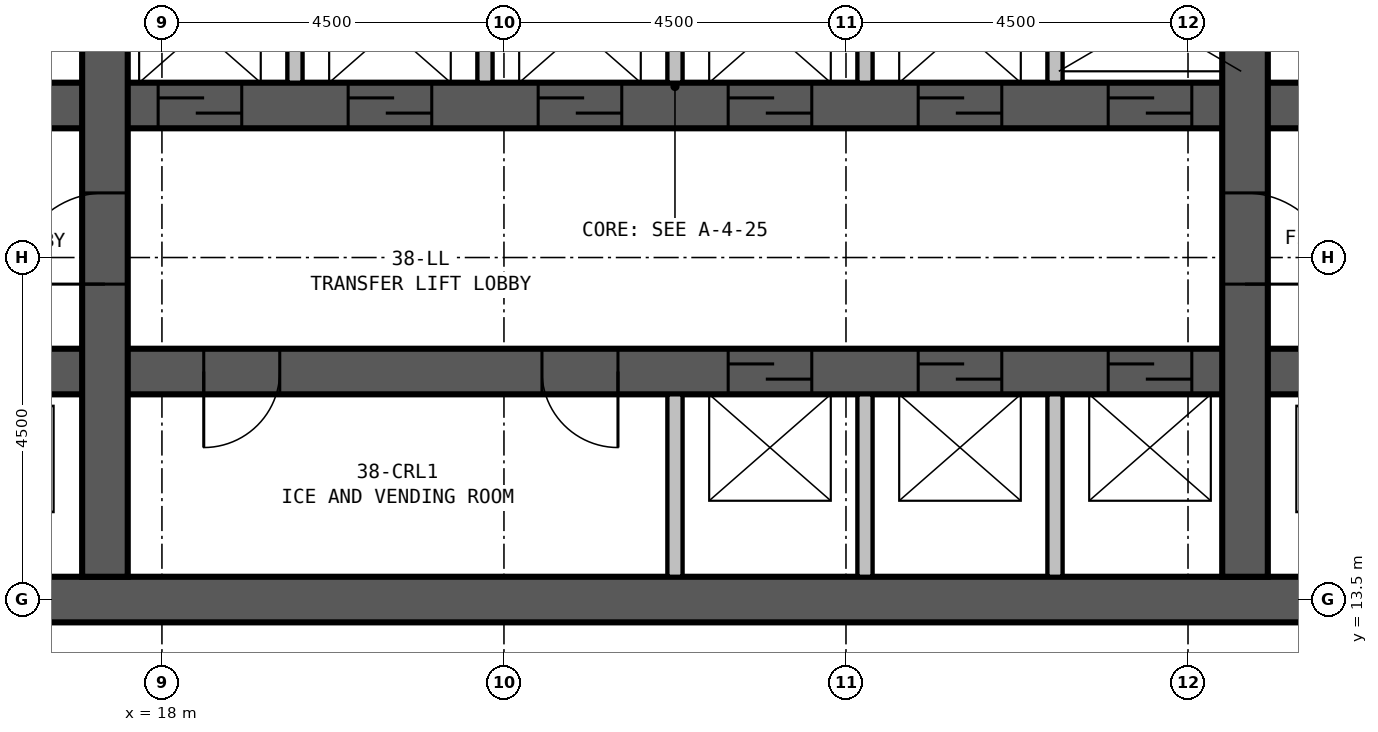
"""IFC4 building model, lengths in metres.
Left out: names, types, materials, properties, quantities, classifications, styles, units other than length and angle.
Written with IfcOpenShell. Run it as: python <this file> out.ifc"""

import sys

from ifc_helpers import new_model, si_unit, direction, frame, frame_2d, origin, place, context, subcontext, project, spatial, rectangle, extrude, element, fill, save


model = new_model("IFC4")
c1 = context("Model", 3, precision=1e-05, world=origin(), true_north=direction((0.0, 1.0)))
c2 = subcontext(c1, "Body", "Model", "MODEL_VIEW")
j1 = project(units=[si_unit("LENGTHUNIT", "METRE"), si_unit("PLANEANGLEUNIT", "RADIAN")], contexts=[c1])
p1 = place(None, origin())
s1 = spatial("IfcSite", under=j1, at=p1, CompositionType="ELEMENT")
p2 = place(p1, origin())
s2 = spatial("IfcBuilding", under=s1, at=p2, CompositionType="ELEMENT")
p3 = place(p2, frame((0.0, 0.0, 145.9)))
s3 = spatial("IfcBuildingStorey", under=s2, at=p3, CompositionType="ELEMENT", Elevation=145.9)
p4 = place(p3, frame((13.2, 13.5, 0.0), z_axis=(0.0, 0.0, 1.0), x_axis=(1.0, 0.0, 0.0)))
e1 = element("IfcWall", 1, at=p4, inside=s3, PredefinedType="SHEAR", context=c2, shape_type="SweptSolid", body=[
    extrude(rectangle(XDim=23.1, YDim=0.6, at=frame_2d((11.55, 0.0))), origin(), (0.0, 0.0, 1.0), 6.0),
])
p5 = place(p3, frame((17.25, 13.8, 0.0), z_axis=(0.0, 0.0, 1.0), x_axis=(0.0, 1.0, 0.0)))
e2 = element("IfcWall", 2, at=p5, inside=s3, PredefinedType="SHEAR", context=c2, shape_type="SweptSolid", body=[
    extrude(rectangle(XDim=12.9, YDim=0.6, at=frame_2d((6.45, 0.0))), origin(), (0.0, 0.0, 1.0), 6.0),
])
p6 = place(p5, frame((3.85, 0.0, 0.0)))
e3 = element("IfcOpeningElement", 3, at=p6, cuts=e2, PredefinedType="OPENING", context=c2, shape_type="SweptSolid", body=[
    extrude(rectangle(XDim=1.2, YDim=2.1, at=frame_2d((0.6, 1.05))), frame((0.0, 0.31, 0.0), z_axis=(0.0, -1.0, 0.0), x_axis=(1.0, 0.0, 0.0)), (0.0, 0.0, 1.0), 0.62),
])
p7 = place(p3, frame((32.25, 13.8, 0.0), z_axis=(0.0, 0.0, 1.0), x_axis=(0.0, 1.0, 0.0)))
e4 = element("IfcWall", 4, at=p7, inside=s3, PredefinedType="SHEAR", context=c2, shape_type="SweptSolid", body=[
    extrude(rectangle(XDim=12.9, YDim=0.6, at=frame_2d((6.45, 0.0))), origin(), (0.0, 0.0, 1.0), 6.0),
])
p8 = place(p7, frame((5.05, 0.0, 0.0), z_axis=(0.0, 0.0, 1.0), x_axis=(-1.0, 0.0, 0.0)))
e5 = element("IfcOpeningElement", 5, at=p8, cuts=e4, PredefinedType="OPENING", context=c2, shape_type="SweptSolid", body=[
    extrude(rectangle(XDim=1.2, YDim=2.1, at=frame_2d((0.6, 1.05))), frame((0.0, 0.31, 0.0), z_axis=(0.0, -1.0, 0.0), x_axis=(1.0, 0.0, 0.0)), (0.0, 0.0, 1.0), 0.62),
])
p9 = place(p3, frame((13.8, 16.5, 0.0), z_axis=(0.0, 0.0, 1.0), x_axis=(1.0, 0.0, 0.0)))
e6 = element("IfcWall", 6, at=p9, inside=s3, PredefinedType="SHEAR", context=c2, shape_type="SweptSolid", body=[
    extrude(rectangle(XDim=21.9, YDim=0.6, at=frame_2d((10.95, 0.0))), origin(), (0.0, 0.0, 1.0), 6.0),
])
p10 = place(p9, frame((11.65, 0.0, 0.0)))
e7 = element("IfcOpeningElement", 7, at=p10, cuts=e6, PredefinedType="OPENING", context=c2, shape_type="SweptSolid", body=[
    extrude(rectangle(XDim=1.1, YDim=2.1, at=frame_2d((0.55, 1.05))), frame((0.0, 0.31, 0.0), z_axis=(0.0, -1.0, 0.0), x_axis=(1.0, 0.0, 0.0)), (0.0, 0.0, 1.0), 0.62),
])
p11 = place(p9, frame((14.15, 0.0, 0.0)))
e8 = element("IfcOpeningElement", 8, at=p11, cuts=e6, PredefinedType="OPENING", context=c2, shape_type="SweptSolid", body=[
    extrude(rectangle(XDim=1.1, YDim=2.1, at=frame_2d((0.55, 1.05))), frame((0.0, 0.31, 0.0), z_axis=(0.0, -1.0, 0.0), x_axis=(1.0, 0.0, 0.0)), (0.0, 0.0, 1.0), 0.62),
])
p12 = place(p9, frame((16.65, 0.0, 0.0)))
e9 = element("IfcOpeningElement", 9, at=p12, cuts=e6, PredefinedType="OPENING", context=c2, shape_type="SweptSolid", body=[
    extrude(rectangle(XDim=1.1, YDim=2.1, at=frame_2d((0.55, 1.05))), frame((0.0, 0.31, 0.0), z_axis=(0.0, -1.0, 0.0), x_axis=(1.0, 0.0, 0.0)), (0.0, 0.0, 1.0), 0.62),
])
p13 = place(p9, frame((5.75, 0.0, 0.0), z_axis=(0.0, 0.0, 1.0), x_axis=(-1.0, 0.0, 0.0)))
e10 = element("IfcOpeningElement", 10, at=p13, cuts=e6, PredefinedType="OPENING", context=c2, shape_type="SweptSolid", body=[
    extrude(rectangle(XDim=1.0, YDim=2.1, at=frame_2d((0.5, 1.05))), frame((0.0, 0.31, 0.0), z_axis=(0.0, -1.0, 0.0), x_axis=(1.0, 0.0, 0.0)), (0.0, 0.0, 1.0), 0.62),
])
p14 = place(p9, frame((10.2, 0.0, 0.0), z_axis=(0.0, 0.0, 1.0), x_axis=(-1.0, 0.0, 0.0)))
e11 = element("IfcOpeningElement", 11, at=p14, cuts=e6, PredefinedType="OPENING", context=c2, shape_type="SweptSolid", body=[
    extrude(rectangle(XDim=1.0, YDim=2.1, at=frame_2d((0.5, 1.05))), frame((0.0, 0.31, 0.0), z_axis=(0.0, -1.0, 0.0), x_axis=(1.0, 0.0, 0.0)), (0.0, 0.0, 1.0), 0.62),
])
p15 = place(p9, frame((0.6, 0.0, 0.0)))
e12 = element("IfcOpeningElement", 12, at=p15, cuts=e6, PredefinedType="OPENING", context=c2, shape_type="SweptSolid", body=[
    extrude(rectangle(XDim=1.2, YDim=2.1, at=frame_2d((0.6, 1.05))), frame((0.0, 0.31, 0.0), z_axis=(0.0, -1.0, 0.0), x_axis=(1.0, 0.0, 0.0)), (0.0, 0.0, 1.0), 0.62),
])
p16 = place(p9, frame((19.6, 0.0, 0.0)))
e13 = element("IfcOpeningElement", 13, at=p16, cuts=e6, PredefinedType="OPENING", context=c2, shape_type="SweptSolid", body=[
    extrude(rectangle(XDim=1.2, YDim=2.1, at=frame_2d((0.6, 1.05))), frame((0.0, 0.31, 0.0), z_axis=(0.0, -1.0, 0.0), x_axis=(1.0, 0.0, 0.0)), (0.0, 0.0, 1.0), 0.62),
])
p17 = place(p3, frame((13.8, 20.0, 0.0), z_axis=(0.0, 0.0, 1.0), x_axis=(1.0, 0.0, 0.0)))
e14 = element("IfcWall", 14, at=p17, inside=s3, PredefinedType="SHEAR", context=c2, shape_type="SweptSolid", body=[
    extrude(rectangle(XDim=21.9, YDim=0.6, at=frame_2d((10.95, 0.0))), origin(), (0.0, 0.0, 1.0), 6.0),
])
p18 = place(p17, frame((0.5, 0.0, 0.0)))
e15 = element("IfcOpeningElement", 15, at=p18, cuts=e14, PredefinedType="OPENING", context=c2, shape_type="SweptSolid", body=[
    extrude(rectangle(XDim=1.0, YDim=2.1, at=frame_2d((0.5, 1.05))), frame((0.0, 0.31, 0.0), z_axis=(0.0, -1.0, 0.0), x_axis=(1.0, 0.0, 0.0)), (0.0, 0.0, 1.0), 0.62),
])
p19 = place(p17, frame((20.5, 0.0, 0.0)))
e16 = element("IfcOpeningElement", 16, at=p19, cuts=e14, PredefinedType="OPENING", context=c2, shape_type="SweptSolid", body=[
    extrude(rectangle(XDim=1.0, YDim=2.1, at=frame_2d((0.5, 1.05))), frame((0.0, 0.31, 0.0), z_axis=(0.0, -1.0, 0.0), x_axis=(1.0, 0.0, 0.0)), (0.0, 0.0, 1.0), 0.62),
])
p20 = place(p17, frame((4.15, 0.0, 0.0)))
e17 = element("IfcOpeningElement", 17, at=p20, cuts=e14, PredefinedType="OPENING", context=c2, shape_type="SweptSolid", body=[
    extrude(rectangle(XDim=1.1, YDim=2.1, at=frame_2d((0.55, 1.05))), frame((0.0, 0.31, 0.0), z_axis=(0.0, -1.0, 0.0), x_axis=(1.0, 0.0, 0.0)), (0.0, 0.0, 1.0), 0.62),
])
p21 = place(p17, frame((6.65, 0.0, 0.0)))
e18 = element("IfcOpeningElement", 18, at=p21, cuts=e14, PredefinedType="OPENING", context=c2, shape_type="SweptSolid", body=[
    extrude(rectangle(XDim=1.1, YDim=2.1, at=frame_2d((0.55, 1.05))), frame((0.0, 0.31, 0.0), z_axis=(0.0, -1.0, 0.0), x_axis=(1.0, 0.0, 0.0)), (0.0, 0.0, 1.0), 0.62),
])
p22 = place(p17, frame((9.15, 0.0, 0.0)))
e19 = element("IfcOpeningElement", 19, at=p22, cuts=e14, PredefinedType="OPENING", context=c2, shape_type="SweptSolid", body=[
    extrude(rectangle(XDim=1.1, YDim=2.1, at=frame_2d((0.55, 1.05))), frame((0.0, 0.31, 0.0), z_axis=(0.0, -1.0, 0.0), x_axis=(1.0, 0.0, 0.0)), (0.0, 0.0, 1.0), 0.62),
])
p23 = place(p17, frame((11.65, 0.0, 0.0)))
e20 = element("IfcOpeningElement", 20, at=p23, cuts=e14, PredefinedType="OPENING", context=c2, shape_type="SweptSolid", body=[
    extrude(rectangle(XDim=1.1, YDim=2.1, at=frame_2d((0.55, 1.05))), frame((0.0, 0.31, 0.0), z_axis=(0.0, -1.0, 0.0), x_axis=(1.0, 0.0, 0.0)), (0.0, 0.0, 1.0), 0.62),
])
p24 = place(p17, frame((14.15, 0.0, 0.0)))
e21 = element("IfcOpeningElement", 21, at=p24, cuts=e14, PredefinedType="OPENING", context=c2, shape_type="SweptSolid", body=[
    extrude(rectangle(XDim=1.1, YDim=2.1, at=frame_2d((0.55, 1.05))), frame((0.0, 0.31, 0.0), z_axis=(0.0, -1.0, 0.0), x_axis=(1.0, 0.0, 0.0)), (0.0, 0.0, 1.0), 0.62),
])
p25 = place(p17, frame((16.65, 0.0, 0.0)))
e22 = element("IfcOpeningElement", 22, at=p25, cuts=e14, PredefinedType="OPENING", context=c2, shape_type="SweptSolid", body=[
    extrude(rectangle(XDim=1.1, YDim=2.1, at=frame_2d((0.55, 1.05))), frame((0.0, 0.31, 0.0), z_axis=(0.0, -1.0, 0.0), x_axis=(1.0, 0.0, 0.0)), (0.0, 0.0, 1.0), 0.62),
])
for number, where, z_axis, x_axis in (
    (23, (19.75, 20.3, 0.0), (0.0, 0.0, 1.0), (0.0, 1.0, 0.0)),
    (24, (22.25, 20.3, 0.0), (0.0, 0.0, 1.0), (0.0, 1.0, 0.0)),
):
    element("IfcWall", number, at=place(p3, frame(where, z_axis=z_axis, x_axis=x_axis)), inside=s3, PredefinedType="PARTITIONING", context=c2, shape_type="SweptSolid", body=[
        extrude(rectangle(XDim=3.1, YDim=0.2, at=frame_2d((1.55, 0.0))), origin(), (0.0, 0.0, 1.0), 5.7),
    ])
p26 = place(p3, frame((24.75, 13.8, 0.0), z_axis=(0.0, 0.0, 1.0), x_axis=(0.0, 1.0, 0.0)))
e25 = element("IfcWall", 25, at=p26, inside=s3, PredefinedType="PARTITIONING", context=c2, shape_type="SweptSolid", body=[
    extrude(rectangle(XDim=2.4, YDim=0.2, at=frame_2d((1.2, 0.0))), origin(), (0.0, 0.0, 1.0), 5.7),
])
p27 = place(p3, frame((24.75, 20.3, 0.0), z_axis=(0.0, 0.0, 1.0), x_axis=(0.0, 1.0, 0.0)))
e26 = element("IfcWall", 26, at=p27, inside=s3, PredefinedType="PARTITIONING", context=c2, shape_type="SweptSolid", body=[
    extrude(rectangle(XDim=3.1, YDim=0.2, at=frame_2d((1.55, 0.0))), origin(), (0.0, 0.0, 1.0), 5.7),
])
p28 = place(p3, frame((27.25, 13.8, 0.0), z_axis=(0.0, 0.0, 1.0), x_axis=(0.0, 1.0, 0.0)))
e27 = element("IfcWall", 27, at=p28, inside=s3, PredefinedType="PARTITIONING", context=c2, shape_type="SweptSolid", body=[
    extrude(rectangle(XDim=2.4, YDim=0.2, at=frame_2d((1.2, 0.0))), origin(), (0.0, 0.0, 1.0), 5.7),
])
p29 = place(p3, frame((27.25, 20.3, 0.0), z_axis=(0.0, 0.0, 1.0), x_axis=(0.0, 1.0, 0.0)))
e28 = element("IfcWall", 28, at=p29, inside=s3, PredefinedType="PARTITIONING", context=c2, shape_type="SweptSolid", body=[
    extrude(rectangle(XDim=3.1, YDim=0.2, at=frame_2d((1.55, 0.0))), origin(), (0.0, 0.0, 1.0), 5.7),
])
p30 = place(p3, frame((29.75, 13.8, 0.0), z_axis=(0.0, 0.0, 1.0), x_axis=(0.0, 1.0, 0.0)))
e29 = element("IfcWall", 29, at=p30, inside=s3, PredefinedType="PARTITIONING", context=c2, shape_type="SweptSolid", body=[
    extrude(rectangle(XDim=2.4, YDim=0.2, at=frame_2d((1.2, 0.0))), origin(), (0.0, 0.0, 1.0), 5.7),
])
p31 = place(p3, frame((29.75, 20.3, 0.0), z_axis=(0.0, 0.0, 1.0), x_axis=(0.0, 1.0, 0.0)))
e30 = element("IfcWall", 30, at=p31, inside=s3, PredefinedType="PARTITIONING", context=c2, shape_type="SweptSolid", body=[
    extrude(rectangle(XDim=3.1, YDim=0.2, at=frame_2d((1.55, 0.0))), origin(), (0.0, 0.0, 1.0), 5.7),
])
p32 = place(p6, origin())
e31 = element("IfcDoor", 31, at=p32, inside=s3, OperationType="SINGLE_SWING_LEFT", PredefinedType="DOOR", context=c2, shape_type="SweptSolid", body=[
    extrude(rectangle(XDim=1.2, YDim=2.1, at=frame_2d((0.6, 1.05))), frame((0.0, 0.3, 0.0), z_axis=(0.0, -1.0, 0.0), x_axis=(1.0, 0.0, 0.0)), (0.0, 0.0, 1.0), 0.6),
])
fill(e3, e31)
p33 = place(p8, origin())
e32 = element("IfcDoor", 32, at=p33, inside=s3, OperationType="SINGLE_SWING_RIGHT", PredefinedType="DOOR", context=c2, shape_type="SweptSolid", body=[
    extrude(rectangle(XDim=1.2, YDim=2.1, at=frame_2d((0.6, 1.05))), frame((0.0, 0.3, 0.0), z_axis=(0.0, -1.0, 0.0), x_axis=(1.0, 0.0, 0.0)), (0.0, 0.0, 1.0), 0.6),
])
fill(e5, e32)
p34 = place(p10, origin())
e33 = element("IfcDoor", 33, at=p34, inside=s3, OperationType="SLIDING_TO_LEFT", PredefinedType="DOOR", context=c2, shape_type="SweptSolid", body=[
    extrude(rectangle(XDim=1.1, YDim=2.1, at=frame_2d((0.55, 1.05))), frame((0.0, 0.3, 0.0), z_axis=(0.0, -1.0, 0.0), x_axis=(1.0, 0.0, 0.0)), (0.0, 0.0, 1.0), 0.6),
])
fill(e7, e33)
p35 = place(p11, origin())
e34 = element("IfcDoor", 34, at=p35, inside=s3, OperationType="SLIDING_TO_LEFT", PredefinedType="DOOR", context=c2, shape_type="SweptSolid", body=[
    extrude(rectangle(XDim=1.1, YDim=2.1, at=frame_2d((0.55, 1.05))), frame((0.0, 0.3, 0.0), z_axis=(0.0, -1.0, 0.0), x_axis=(1.0, 0.0, 0.0)), (0.0, 0.0, 1.0), 0.6),
])
fill(e8, e34)
p36 = place(p12, origin())
e35 = element("IfcDoor", 35, at=p36, inside=s3, OperationType="SLIDING_TO_LEFT", PredefinedType="DOOR", context=c2, shape_type="SweptSolid", body=[
    extrude(rectangle(XDim=1.1, YDim=2.1, at=frame_2d((0.55, 1.05))), frame((0.0, 0.3, 0.0), z_axis=(0.0, -1.0, 0.0), x_axis=(1.0, 0.0, 0.0)), (0.0, 0.0, 1.0), 0.6),
])
fill(e9, e35)
p37 = place(p20, origin())
e36 = element("IfcDoor", 36, at=p37, inside=s3, OperationType="SLIDING_TO_LEFT", PredefinedType="DOOR", context=c2, shape_type="SweptSolid", body=[
    extrude(rectangle(XDim=1.1, YDim=2.1, at=frame_2d((0.55, 1.05))), frame((0.0, 0.3, 0.0), z_axis=(0.0, -1.0, 0.0), x_axis=(1.0, 0.0, 0.0)), (0.0, 0.0, 1.0), 0.6),
])
fill(e17, e36)
p38 = place(p21, origin())
e37 = element("IfcDoor", 37, at=p38, inside=s3, OperationType="SLIDING_TO_LEFT", PredefinedType="DOOR", context=c2, shape_type="SweptSolid", body=[
    extrude(rectangle(XDim=1.1, YDim=2.1, at=frame_2d((0.55, 1.05))), frame((0.0, 0.3, 0.0), z_axis=(0.0, -1.0, 0.0), x_axis=(1.0, 0.0, 0.0)), (0.0, 0.0, 1.0), 0.6),
])
fill(e18, e37)
p39 = place(p22, origin())
e38 = element("IfcDoor", 38, at=p39, inside=s3, OperationType="SLIDING_TO_LEFT", PredefinedType="DOOR", context=c2, shape_type="SweptSolid", body=[
    extrude(rectangle(XDim=1.1, YDim=2.1, at=frame_2d((0.55, 1.05))), frame((0.0, 0.3, 0.0), z_axis=(0.0, -1.0, 0.0), x_axis=(1.0, 0.0, 0.0)), (0.0, 0.0, 1.0), 0.6),
])
fill(e19, e38)
p40 = place(p23, origin())
e39 = element("IfcDoor", 39, at=p40, inside=s3, OperationType="SLIDING_TO_LEFT", PredefinedType="DOOR", context=c2, shape_type="SweptSolid", body=[
    extrude(rectangle(XDim=1.1, YDim=2.1, at=frame_2d((0.55, 1.05))), frame((0.0, 0.3, 0.0), z_axis=(0.0, -1.0, 0.0), x_axis=(1.0, 0.0, 0.0)), (0.0, 0.0, 1.0), 0.6),
])
fill(e20, e39)
p41 = place(p24, origin())
e40 = element("IfcDoor", 40, at=p41, inside=s3, OperationType="SLIDING_TO_LEFT", PredefinedType="DOOR", context=c2, shape_type="SweptSolid", body=[
    extrude(rectangle(XDim=1.1, YDim=2.1, at=frame_2d((0.55, 1.05))), frame((0.0, 0.3, 0.0), z_axis=(0.0, -1.0, 0.0), x_axis=(1.0, 0.0, 0.0)), (0.0, 0.0, 1.0), 0.6),
])
fill(e21, e40)
p42 = place(p25, origin())
e41 = element("IfcDoor", 41, at=p42, inside=s3, OperationType="SLIDING_TO_LEFT", PredefinedType="DOOR", context=c2, shape_type="SweptSolid", body=[
    extrude(rectangle(XDim=1.1, YDim=2.1, at=frame_2d((0.55, 1.05))), frame((0.0, 0.3, 0.0), z_axis=(0.0, -1.0, 0.0), x_axis=(1.0, 0.0, 0.0)), (0.0, 0.0, 1.0), 0.6),
])
fill(e22, e41)
p43 = place(p13, origin())
e42 = element("IfcDoor", 42, at=p43, inside=s3, OperationType="SINGLE_SWING_RIGHT", PredefinedType="DOOR", context=c2, shape_type="SweptSolid", body=[
    extrude(rectangle(XDim=1.0, YDim=2.1, at=frame_2d((0.5, 1.05))), frame((0.0, 0.3, 0.0), z_axis=(0.0, -1.0, 0.0), x_axis=(1.0, 0.0, 0.0)), (0.0, 0.0, 1.0), 0.6),
])
fill(e10, e42)
p44 = place(p14, origin())
e43 = element("IfcDoor", 43, at=p44, inside=s3, OperationType="SINGLE_SWING_LEFT", PredefinedType="DOOR", context=c2, shape_type="SweptSolid", body=[
    extrude(rectangle(XDim=1.0, YDim=2.1, at=frame_2d((0.5, 1.05))), frame((0.0, 0.3, 0.0), z_axis=(0.0, -1.0, 0.0), x_axis=(1.0, 0.0, 0.0)), (0.0, 0.0, 1.0), 0.6),
])
fill(e11, e43)
save(model, sys.argv[1])
